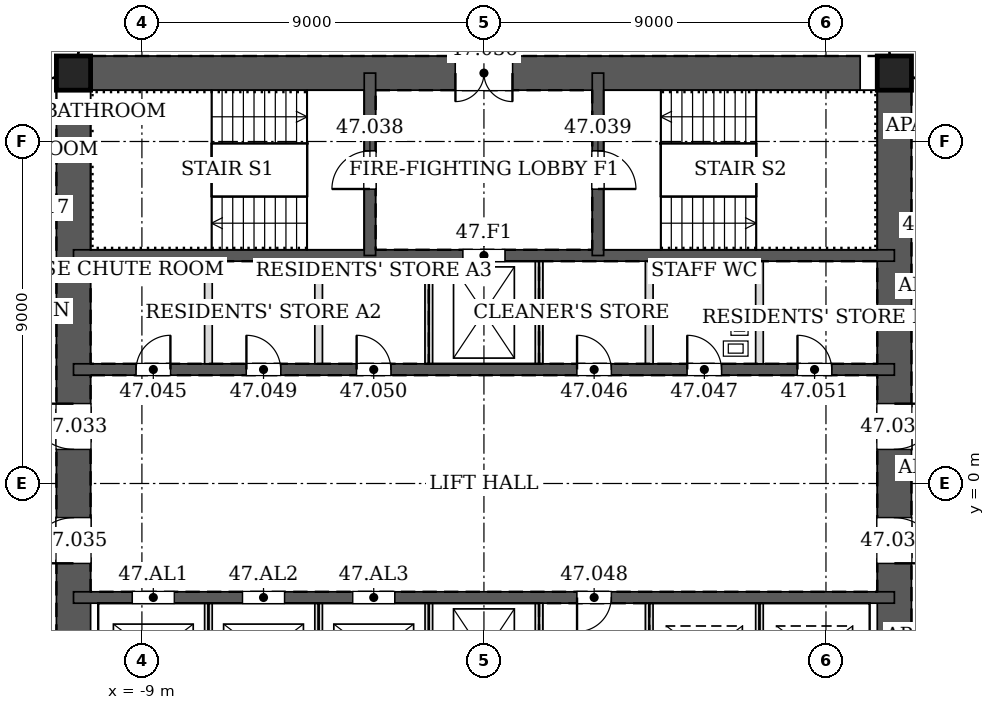
"""IFC4 building model, lengths in metres.
Left out: names, types, materials, properties, quantities, classifications, styles, units other than length and angle.
Written with IfcOpenShell. Run it as: python <this file> out.ifc"""

import sys

from ifc_helpers import new_model, si_unit, direction, frame, frame_2d, origin, origin_2d, place, context, subcontext, project, spatial, rectangle, hollow_rectangle, extrude, element, fill, save


model = new_model("IFC4")
c1 = context("Model", 3, precision=1e-05, world=origin(), true_north=direction((0.0, 1.0)))
c2 = subcontext(c1, "Body", "Model", "MODEL_VIEW")
j1 = project(units=[si_unit("LENGTHUNIT", "METRE"), si_unit("PLANEANGLEUNIT", "RADIAN")], contexts=[c1])
p1 = place(None, origin())
s1 = spatial("IfcSite", under=j1, at=p1, CompositionType="ELEMENT")
p2 = place(p1, origin())
s2 = spatial("IfcBuilding", under=s1, at=p2, CompositionType="ELEMENT")
p3 = place(p2, frame((0.0, 0.0, 207.4)))
s3 = spatial("IfcBuildingStorey", under=s2, at=p3, CompositionType="ELEMENT", Elevation=207.4)
for number, where, z_axis, x_axis in (
    (1, (10.8, 10.8, 0.0), (0.0, 0.0, 1.0), (1.0, 0.0, 0.0)),
    (2, (-10.8, 10.8, 0.0), (0.0, 0.0, 1.0), (1.0, 0.0, 0.0)),
):
    element("IfcColumn", number, at=place(p3, frame(where, z_axis=z_axis, x_axis=x_axis)), inside=s3, PredefinedType="COLUMN", context=c2, shape_type="SweptSolid", body=[
        extrude(hollow_rectangle(XDim=0.9, YDim=0.9, WallThickness=0.05, at=origin_2d()), origin(), (0.0, 0.0, 1.0), 3.4),
    ])
p4 = place(p3, frame((10.8, -10.8, 0.0), z_axis=(0.0, 0.0, 1.0), x_axis=(0.0, 1.0, 0.0)))
e3 = element("IfcWall", 3, at=p4, inside=s3, PredefinedType="SOLIDWALL", context=c2, shape_type="SweptSolid", body=[
    extrude(rectangle(XDim=21.6, YDim=0.9, at=frame_2d((10.8, 0.0))), origin(), (0.0, 0.0, 1.0), 3.4),
])
p5 = place(p4, frame((11.7, 0.0, 0.0)))
e4 = element("IfcOpeningElement", 4, at=p5, cuts=e3, PredefinedType="OPENING", context=c2, shape_type="SweptSolid", body=[
    extrude(rectangle(XDim=1.2, YDim=2.1, at=frame_2d((0.6, 1.05))), frame((0.0, 0.46, 0.0), z_axis=(0.0, -1.0, 0.0), x_axis=(1.0, 0.0, 0.0)), (0.0, 0.0, 1.0), 0.92),
])
p6 = place(p4, frame((8.7, 0.0, 0.0)))
e5 = element("IfcOpeningElement", 5, at=p6, cuts=e3, PredefinedType="OPENING", context=c2, shape_type="SweptSolid", body=[
    extrude(rectangle(XDim=1.2, YDim=2.1, at=frame_2d((0.6, 1.05))), frame((0.0, 0.46, 0.0), z_axis=(0.0, -1.0, 0.0), x_axis=(1.0, 0.0, 0.0)), (0.0, 0.0, 1.0), 0.92),
])
p7 = place(p3, frame((10.8, 10.8, 0.0), z_axis=(0.0, 0.0, 1.0), x_axis=(-1.0, 0.0, 0.0)))
e6 = element("IfcWall", 6, at=p7, inside=s3, PredefinedType="SOLIDWALL", context=c2, shape_type="SweptSolid", body=[
    extrude(rectangle(XDim=21.6, YDim=0.9, at=frame_2d((10.8, 0.0))), origin(), (0.0, 0.0, 1.0), 3.4),
])
p8 = place(p7, frame((10.05, 0.0, 0.0)))
e7 = element("IfcOpeningElement", 7, at=p8, cuts=e6, PredefinedType="OPENING", context=c2, shape_type="SweptSolid", body=[
    extrude(rectangle(XDim=1.5, YDim=2.1, at=frame_2d((0.75, 1.05))), frame((0.0, 0.46, 0.0), z_axis=(0.0, -1.0, 0.0), x_axis=(1.0, 0.0, 0.0)), (0.0, 0.0, 1.0), 0.92),
])
p9 = place(p3, frame((-10.8, 10.8, 0.0), z_axis=(0.0, 0.0, 1.0), x_axis=(0.0, -1.0, 0.0)))
e8 = element("IfcWall", 8, at=p9, inside=s3, PredefinedType="SOLIDWALL", context=c2, shape_type="SweptSolid", body=[
    extrude(rectangle(XDim=21.6, YDim=0.9, at=frame_2d((10.8, 0.0))), origin(), (0.0, 0.0, 1.0), 3.4),
])
p10 = place(p9, frame((8.7, 0.0, 0.0)))
e9 = element("IfcOpeningElement", 9, at=p10, cuts=e8, PredefinedType="OPENING", context=c2, shape_type="SweptSolid", body=[
    extrude(rectangle(XDim=1.2, YDim=2.1, at=frame_2d((0.6, 1.05))), frame((0.0, 0.46, 0.0), z_axis=(0.0, -1.0, 0.0), x_axis=(1.0, 0.0, 0.0)), (0.0, 0.0, 1.0), 0.92),
])
p11 = place(p9, frame((11.7, 0.0, 0.0)))
e10 = element("IfcOpeningElement", 10, at=p11, cuts=e8, PredefinedType="OPENING", context=c2, shape_type="SweptSolid", body=[
    extrude(rectangle(XDim=1.2, YDim=2.1, at=frame_2d((0.6, 1.05))), frame((0.0, 0.46, 0.0), z_axis=(0.0, -1.0, 0.0), x_axis=(1.0, 0.0, 0.0)), (0.0, 0.0, 1.0), 0.92),
])
p12 = place(p3, frame((-10.8, 3.0, 0.0), z_axis=(0.0, 0.0, 1.0), x_axis=(1.0, 0.0, 0.0)))
e11 = element("IfcWall", 11, at=p12, inside=s3, PredefinedType="SOLIDWALL", context=c2, shape_type="SweptSolid", body=[
    extrude(rectangle(XDim=21.6, YDim=0.3, at=frame_2d((10.8, 0.0))), origin(), (0.0, 0.0, 1.0), 3.4),
])
p13 = place(p12, frame((1.65, 0.0, 0.0)))
e12 = element("IfcOpeningElement", 12, at=p13, cuts=e11, PredefinedType="OPENING", context=c2, shape_type="SweptSolid", body=[
    extrude(rectangle(XDim=0.9, YDim=2.1, at=frame_2d((0.45, 1.05))), frame((0.0, 0.16, 0.0), z_axis=(0.0, -1.0, 0.0), x_axis=(1.0, 0.0, 0.0)), (0.0, 0.0, 1.0), 0.32),
])
p14 = place(p12, frame((13.25, 0.0, 0.0)))
e13 = element("IfcOpeningElement", 13, at=p14, cuts=e11, PredefinedType="OPENING", context=c2, shape_type="SweptSolid", body=[
    extrude(rectangle(XDim=0.9, YDim=2.1, at=frame_2d((0.45, 1.05))), frame((0.0, 0.16, 0.0), z_axis=(0.0, -1.0, 0.0), x_axis=(1.0, 0.0, 0.0)), (0.0, 0.0, 1.0), 0.32),
])
p15 = place(p12, frame((16.15, 0.0, 0.0)))
e14 = element("IfcOpeningElement", 14, at=p15, cuts=e11, PredefinedType="OPENING", context=c2, shape_type="SweptSolid", body=[
    extrude(rectangle(XDim=0.9, YDim=2.1, at=frame_2d((0.45, 1.05))), frame((0.0, 0.16, 0.0), z_axis=(0.0, -1.0, 0.0), x_axis=(1.0, 0.0, 0.0)), (0.0, 0.0, 1.0), 0.32),
])
p16 = place(p12, frame((4.55, 0.0, 0.0)))
e15 = element("IfcOpeningElement", 15, at=p16, cuts=e11, PredefinedType="OPENING", context=c2, shape_type="SweptSolid", body=[
    extrude(rectangle(XDim=0.9, YDim=2.1, at=frame_2d((0.45, 1.05))), frame((0.0, 0.16, 0.0), z_axis=(0.0, -1.0, 0.0), x_axis=(1.0, 0.0, 0.0)), (0.0, 0.0, 1.0), 0.32),
])
p17 = place(p12, frame((7.45, 0.0, 0.0)))
e16 = element("IfcOpeningElement", 16, at=p17, cuts=e11, PredefinedType="OPENING", context=c2, shape_type="SweptSolid", body=[
    extrude(rectangle(XDim=0.9, YDim=2.1, at=frame_2d((0.45, 1.05))), frame((0.0, 0.16, 0.0), z_axis=(0.0, -1.0, 0.0), x_axis=(1.0, 0.0, 0.0)), (0.0, 0.0, 1.0), 0.32),
])
p18 = place(p12, frame((19.05, 0.0, 0.0)))
e17 = element("IfcOpeningElement", 17, at=p18, cuts=e11, PredefinedType="OPENING", context=c2, shape_type="SweptSolid", body=[
    extrude(rectangle(XDim=0.9, YDim=2.1, at=frame_2d((0.45, 1.05))), frame((0.0, 0.16, 0.0), z_axis=(0.0, -1.0, 0.0), x_axis=(1.0, 0.0, 0.0)), (0.0, 0.0, 1.0), 0.32),
])
p19 = place(p3, frame((-10.8, 6.0, 0.0), z_axis=(0.0, 0.0, 1.0), x_axis=(1.0, 0.0, 0.0)))
e18 = element("IfcWall", 18, at=p19, inside=s3, PredefinedType="SOLIDWALL", context=c2, shape_type="SweptSolid", body=[
    extrude(rectangle(XDim=21.6, YDim=0.3, at=frame_2d((10.8, 0.0))), origin(), (0.0, 0.0, 1.0), 3.4),
])
p20 = place(p19, frame((10.25, 0.0, 0.0)))
e19 = element("IfcOpeningElement", 19, at=p20, cuts=e18, PredefinedType="OPENING", context=c2, shape_type="SweptSolid", body=[
    extrude(rectangle(XDim=1.1, YDim=2.1, at=frame_2d((0.55, 1.05))), frame((0.0, 0.16, 0.0), z_axis=(0.0, -1.0, 0.0), x_axis=(1.0, 0.0, 0.0)), (0.0, 0.0, 1.0), 0.32),
])
p21 = place(p3, frame((-3.0, 6.0, 0.0), z_axis=(0.0, 0.0, 1.0), x_axis=(0.0, 1.0, 0.0)))
e20 = element("IfcWall", 20, at=p21, inside=s3, PredefinedType="SOLIDWALL", context=c2, shape_type="SweptSolid", body=[
    extrude(rectangle(XDim=4.8, YDim=0.3, at=frame_2d((2.4, 0.0))), origin(), (0.0, 0.0, 1.0), 3.4),
])
p22 = place(p21, frame((1.75, 0.0, 0.0)))
e21 = element("IfcOpeningElement", 21, at=p22, cuts=e20, PredefinedType="OPENING", context=c2, shape_type="SweptSolid", body=[
    extrude(rectangle(XDim=1.0, YDim=2.1, at=frame_2d((0.5, 1.05))), frame((0.0, 0.16, 0.0), z_axis=(0.0, -1.0, 0.0), x_axis=(1.0, 0.0, 0.0)), (0.0, 0.0, 1.0), 0.32),
])
p23 = place(p3, frame((3.0, 6.0, 0.0), z_axis=(0.0, 0.0, 1.0), x_axis=(0.0, 1.0, 0.0)))
e22 = element("IfcWall", 22, at=p23, inside=s3, PredefinedType="SOLIDWALL", context=c2, shape_type="SweptSolid", body=[
    extrude(rectangle(XDim=4.8, YDim=0.3, at=frame_2d((2.4, 0.0))), origin(), (0.0, 0.0, 1.0), 3.4),
])
p24 = place(p23, frame((1.75, 0.0, 0.0)))
e23 = element("IfcOpeningElement", 23, at=p24, cuts=e22, PredefinedType="OPENING", context=c2, shape_type="SweptSolid", body=[
    extrude(rectangle(XDim=1.0, YDim=2.1, at=frame_2d((0.5, 1.05))), frame((0.0, 0.16, 0.0), z_axis=(0.0, -1.0, 0.0), x_axis=(1.0, 0.0, 0.0)), (0.0, 0.0, 1.0), 0.32),
])
p25 = place(p3, frame((-10.8, -3.0, 0.0), z_axis=(0.0, 0.0, 1.0), x_axis=(1.0, 0.0, 0.0)))
e24 = element("IfcWall", 24, at=p25, inside=s3, PredefinedType="SOLIDWALL", context=c2, shape_type="SweptSolid", body=[
    extrude(rectangle(XDim=21.6, YDim=0.3, at=frame_2d((10.8, 0.0))), origin(), (0.0, 0.0, 1.0), 3.4),
])
p26 = place(p25, frame((13.25, 0.0, 0.0)))
e25 = element("IfcOpeningElement", 25, at=p26, cuts=e24, PredefinedType="OPENING", context=c2, shape_type="SweptSolid", body=[
    extrude(rectangle(XDim=0.9, YDim=2.1, at=frame_2d((0.45, 1.05))), frame((0.0, 0.16, 0.0), z_axis=(0.0, -1.0, 0.0), x_axis=(1.0, 0.0, 0.0)), (0.0, 0.0, 1.0), 0.32),
])
p27 = place(p25, frame((1.55, 0.0, 0.0)))
e26 = element("IfcOpeningElement", 26, at=p27, cuts=e24, PredefinedType="OPENING", context=c2, shape_type="SweptSolid", body=[
    extrude(rectangle(XDim=1.1, YDim=2.1, at=frame_2d((0.55, 1.05))), frame((0.0, 0.16, 0.0), z_axis=(0.0, -1.0, 0.0), x_axis=(1.0, 0.0, 0.0)), (0.0, 0.0, 1.0), 0.32),
])
p28 = place(p25, frame((4.45, 0.0, 0.0)))
e27 = element("IfcOpeningElement", 27, at=p28, cuts=e24, PredefinedType="OPENING", context=c2, shape_type="SweptSolid", body=[
    extrude(rectangle(XDim=1.1, YDim=2.1, at=frame_2d((0.55, 1.05))), frame((0.0, 0.16, 0.0), z_axis=(0.0, -1.0, 0.0), x_axis=(1.0, 0.0, 0.0)), (0.0, 0.0, 1.0), 0.32),
])
p29 = place(p25, frame((7.35, 0.0, 0.0)))
e28 = element("IfcOpeningElement", 28, at=p29, cuts=e24, PredefinedType="OPENING", context=c2, shape_type="SweptSolid", body=[
    extrude(rectangle(XDim=1.1, YDim=2.1, at=frame_2d((0.55, 1.05))), frame((0.0, 0.16, 0.0), z_axis=(0.0, -1.0, 0.0), x_axis=(1.0, 0.0, 0.0)), (0.0, 0.0, 1.0), 0.32),
])
for number, where, z_axis, x_axis in (
    (29, (-7.25, 3.15, 0.0), (0.0, 0.0, 1.0), (0.0, 1.0, 0.0)),
    (30, (-4.35, 3.15, 0.0), (0.0, 0.0, 1.0), (0.0, 1.0, 0.0)),
    (31, (-1.45, 3.15, 0.0), (0.0, 0.0, 1.0), (0.0, 1.0, 0.0)),
    (32, (1.45, 3.15, 0.0), (0.0, 0.0, 1.0), (0.0, 1.0, 0.0)),
    (33, (4.35, 3.15, 0.0), (0.0, 0.0, 1.0), (0.0, 1.0, 0.0)),
    (34, (7.25, 3.15, 0.0), (0.0, 0.0, 1.0), (0.0, 1.0, 0.0)),
):
    element("IfcWall", number, at=place(p3, frame(where, z_axis=z_axis, x_axis=x_axis)), inside=s3, PredefinedType="PARTITIONING", context=c2, shape_type="SweptSolid", body=[
        extrude(rectangle(XDim=2.7, YDim=0.2, at=frame_2d((1.35, 0.0))), origin(), (0.0, 0.0, 1.0), 3.2),
    ])
for number, where, z_axis, x_axis in (
    (35, (-7.25, -5.85, 0.0), (0.0, 0.0, 1.0), (0.0, 1.0, 0.0)),
    (36, (-4.35, -5.85, 0.0), (0.0, 0.0, 1.0), (0.0, 1.0, 0.0)),
    (37, (-1.45, -5.85, 0.0), (0.0, 0.0, 1.0), (0.0, 1.0, 0.0)),
):
    element("IfcWall", number, at=place(p3, frame(where, z_axis=z_axis, x_axis=x_axis)), inside=s3, PredefinedType="PARTITIONING", context=c2, shape_type="SweptSolid", body=[
        extrude(rectangle(XDim=2.7, YDim=0.2, at=frame_2d((1.35, 0.0))), origin(), (0.0, 0.0, 1.0), 3.4),
    ])
for number, where, z_axis, x_axis in (
    (38, (1.45, -5.85, 0.0), (0.0, 0.0, 1.0), (0.0, 1.0, 0.0)),
    (39, (4.35, -5.85, 0.0), (0.0, 0.0, 1.0), (0.0, 1.0, 0.0)),
):
    element("IfcWall", number, at=place(p3, frame(where, z_axis=z_axis, x_axis=x_axis)), inside=s3, PredefinedType="PARTITIONING", context=c2, shape_type="SweptSolid", body=[
        extrude(rectangle(XDim=2.7, YDim=0.2, at=frame_2d((1.35, 0.0))), origin(), (0.0, 0.0, 1.0), 3.2),
    ])
p30 = place(p3, frame((7.25, -5.85, 0.0), z_axis=(0.0, 0.0, 1.0), x_axis=(0.0, 1.0, 0.0)))
e40 = element("IfcWall", 40, at=p30, inside=s3, PredefinedType="PARTITIONING", context=c2, shape_type="SweptSolid", body=[
    extrude(rectangle(XDim=2.7, YDim=0.2, at=frame_2d((1.35, 0.0))), origin(), (0.0, 0.0, 1.0), 3.4),
])
p31 = place(p5, frame((1.2, 0.0, 0.0), z_axis=(0.0, 0.0, 1.0), x_axis=(-1.0, 0.0, 0.0)))
e41 = element("IfcDoor", 41, at=p31, inside=s3, OperationType="SINGLE_SWING_LEFT", PredefinedType="DOOR", context=c2, shape_type="SweptSolid", body=[
    extrude(rectangle(XDim=1.2, YDim=2.1, at=frame_2d((0.6, 1.05))), frame((0.0, 0.025, 0.0), z_axis=(0.0, -1.0, 0.0), x_axis=(1.0, 0.0, 0.0)), (0.0, 0.0, 1.0), 0.05),
])
fill(e4, e41)
p32 = place(p10, frame((1.2, 0.0, 0.0), z_axis=(0.0, 0.0, 1.0), x_axis=(-1.0, 0.0, 0.0)))
e42 = element("IfcDoor", 42, at=p32, inside=s3, OperationType="SINGLE_SWING_RIGHT", PredefinedType="DOOR", context=c2, shape_type="SweptSolid", body=[
    extrude(rectangle(XDim=1.2, YDim=2.1, at=frame_2d((0.6, 1.05))), frame((0.0, 0.025, 0.0), z_axis=(0.0, -1.0, 0.0), x_axis=(1.0, 0.0, 0.0)), (0.0, 0.0, 1.0), 0.05),
])
fill(e9, e42)
p33 = place(p6, frame((1.2, 0.0, 0.0), z_axis=(0.0, 0.0, 1.0), x_axis=(-1.0, 0.0, 0.0)))
e43 = element("IfcDoor", 43, at=p33, inside=s3, OperationType="SINGLE_SWING_RIGHT", PredefinedType="DOOR", context=c2, shape_type="SweptSolid", body=[
    extrude(rectangle(XDim=1.2, YDim=2.1, at=frame_2d((0.6, 1.05))), frame((0.0, 0.025, 0.0), z_axis=(0.0, -1.0, 0.0), x_axis=(1.0, 0.0, 0.0)), (0.0, 0.0, 1.0), 0.05),
])
fill(e5, e43)
p34 = place(p11, frame((1.2, 0.0, 0.0), z_axis=(0.0, 0.0, 1.0), x_axis=(-1.0, 0.0, 0.0)))
e44 = element("IfcDoor", 44, at=p34, inside=s3, OperationType="SINGLE_SWING_LEFT", PredefinedType="DOOR", context=c2, shape_type="SweptSolid", body=[
    extrude(rectangle(XDim=1.2, YDim=2.1, at=frame_2d((0.6, 1.05))), frame((0.0, 0.025, 0.0), z_axis=(0.0, -1.0, 0.0), x_axis=(1.0, 0.0, 0.0)), (0.0, 0.0, 1.0), 0.05),
])
fill(e10, e44)
p35 = place(p8, origin())
e45 = element("IfcDoor", 45, at=p35, inside=s3, OperationType="DOUBLE_DOOR_SINGLE_SWING", PredefinedType="DOOR", context=c2, shape_type="SweptSolid", body=[
    extrude(rectangle(XDim=1.5, YDim=2.1, at=frame_2d((0.75, 1.05))), frame((0.0, 0.025, 0.0), z_axis=(0.0, -1.0, 0.0), x_axis=(1.0, 0.0, 0.0)), (0.0, 0.0, 1.0), 0.05),
])
fill(e7, e45)
p36 = place(p22, origin())
e46 = element("IfcDoor", 46, at=p36, inside=s3, OperationType="SINGLE_SWING_LEFT", PredefinedType="DOOR", context=c2, shape_type="SweptSolid", body=[
    extrude(rectangle(XDim=1.0, YDim=2.1, at=frame_2d((0.5, 1.05))), frame((0.0, 0.025, 0.0), z_axis=(0.0, -1.0, 0.0), x_axis=(1.0, 0.0, 0.0)), (0.0, 0.0, 1.0), 0.05),
])
fill(e21, e46)
p37 = place(p24, frame((1.0, 0.0, 0.0), z_axis=(0.0, 0.0, 1.0), x_axis=(-1.0, 0.0, 0.0)))
e47 = element("IfcDoor", 47, at=p37, inside=s3, OperationType="SINGLE_SWING_RIGHT", PredefinedType="DOOR", context=c2, shape_type="SweptSolid", body=[
    extrude(rectangle(XDim=1.0, YDim=2.1, at=frame_2d((0.5, 1.05))), frame((0.0, 0.025, 0.0), z_axis=(0.0, -1.0, 0.0), x_axis=(1.0, 0.0, 0.0)), (0.0, 0.0, 1.0), 0.05),
])
fill(e23, e47)
p38 = place(p13, origin())
e48 = element("IfcDoor", 48, at=p38, inside=s3, OperationType="SINGLE_SWING_RIGHT", PredefinedType="DOOR", context=c2, shape_type="SweptSolid", body=[
    extrude(rectangle(XDim=0.9, YDim=2.1, at=frame_2d((0.45, 1.05))), frame((0.0, 0.025, 0.0), z_axis=(0.0, -1.0, 0.0), x_axis=(1.0, 0.0, 0.0)), (0.0, 0.0, 1.0), 0.05),
])
fill(e12, e48)
p39 = place(p14, origin())
e49 = element("IfcDoor", 49, at=p39, inside=s3, OperationType="SINGLE_SWING_LEFT", PredefinedType="DOOR", context=c2, shape_type="SweptSolid", body=[
    extrude(rectangle(XDim=0.9, YDim=2.1, at=frame_2d((0.45, 1.05))), frame((0.0, 0.025, 0.0), z_axis=(0.0, -1.0, 0.0), x_axis=(1.0, 0.0, 0.0)), (0.0, 0.0, 1.0), 0.05),
])
fill(e13, e49)
p40 = place(p15, origin())
e50 = element("IfcDoor", 50, at=p40, inside=s3, OperationType="SINGLE_SWING_LEFT", PredefinedType="DOOR", context=c2, shape_type="SweptSolid", body=[
    extrude(rectangle(XDim=0.9, YDim=2.1, at=frame_2d((0.45, 1.05))), frame((0.0, 0.025, 0.0), z_axis=(0.0, -1.0, 0.0), x_axis=(1.0, 0.0, 0.0)), (0.0, 0.0, 1.0), 0.05),
])
fill(e14, e50)
p41 = place(p26, frame((0.9, 0.0, 0.0), z_axis=(0.0, 0.0, 1.0), x_axis=(-1.0, 0.0, 0.0)))
e51 = element("IfcDoor", 51, at=p41, inside=s3, OperationType="SINGLE_SWING_RIGHT", PredefinedType="DOOR", context=c2, shape_type="SweptSolid", body=[
    extrude(rectangle(XDim=0.9, YDim=2.1, at=frame_2d((0.45, 1.05))), frame((0.0, 0.025, 0.0), z_axis=(0.0, -1.0, 0.0), x_axis=(1.0, 0.0, 0.0)), (0.0, 0.0, 1.0), 0.05),
])
fill(e25, e51)
p42 = place(p16, origin())
e52 = element("IfcDoor", 52, at=p42, inside=s3, OperationType="SINGLE_SWING_LEFT", PredefinedType="DOOR", context=c2, shape_type="SweptSolid", body=[
    extrude(rectangle(XDim=0.9, YDim=2.1, at=frame_2d((0.45, 1.05))), frame((0.0, 0.025, 0.0), z_axis=(0.0, -1.0, 0.0), x_axis=(1.0, 0.0, 0.0)), (0.0, 0.0, 1.0), 0.05),
])
fill(e15, e52)
p43 = place(p17, origin())
e53 = element("IfcDoor", 53, at=p43, inside=s3, OperationType="SINGLE_SWING_LEFT", PredefinedType="DOOR", context=c2, shape_type="SweptSolid", body=[
    extrude(rectangle(XDim=0.9, YDim=2.1, at=frame_2d((0.45, 1.05))), frame((0.0, 0.025, 0.0), z_axis=(0.0, -1.0, 0.0), x_axis=(1.0, 0.0, 0.0)), (0.0, 0.0, 1.0), 0.05),
])
fill(e16, e53)
p44 = place(p18, origin())
e54 = element("IfcDoor", 54, at=p44, inside=s3, OperationType="SINGLE_SWING_LEFT", PredefinedType="DOOR", context=c2, shape_type="SweptSolid", body=[
    extrude(rectangle(XDim=0.9, YDim=2.1, at=frame_2d((0.45, 1.05))), frame((0.0, 0.025, 0.0), z_axis=(0.0, -1.0, 0.0), x_axis=(1.0, 0.0, 0.0)), (0.0, 0.0, 1.0), 0.05),
])
fill(e17, e54)
p45 = place(p20, origin())
e55 = element("IfcDoor", 55, at=p45, inside=s3, OperationType="DOUBLE_DOOR_SLIDING", PredefinedType="DOOR", context=c2, shape_type="SweptSolid", body=[
    extrude(rectangle(XDim=1.1, YDim=2.1, at=frame_2d((0.55, 1.05))), frame((0.0, 0.025, 0.0), z_axis=(0.0, -1.0, 0.0), x_axis=(1.0, 0.0, 0.0)), (0.0, 0.0, 1.0), 0.05),
])
fill(e19, e55)
p46 = place(p27, origin())
e56 = element("IfcDoor", 56, at=p46, inside=s3, OperationType="DOUBLE_DOOR_SLIDING", PredefinedType="DOOR", context=c2, shape_type="SweptSolid", body=[
    extrude(rectangle(XDim=1.1, YDim=2.1, at=frame_2d((0.55, 1.05))), frame((0.0, 0.025, 0.0), z_axis=(0.0, -1.0, 0.0), x_axis=(1.0, 0.0, 0.0)), (0.0, 0.0, 1.0), 0.05),
])
fill(e26, e56)
p47 = place(p28, origin())
e57 = element("IfcDoor", 57, at=p47, inside=s3, OperationType="DOUBLE_DOOR_SLIDING", PredefinedType="DOOR", context=c2, shape_type="SweptSolid", body=[
    extrude(rectangle(XDim=1.1, YDim=2.1, at=frame_2d((0.55, 1.05))), frame((0.0, 0.025, 0.0), z_axis=(0.0, -1.0, 0.0), x_axis=(1.0, 0.0, 0.0)), (0.0, 0.0, 1.0), 0.05),
])
fill(e27, e57)
p48 = place(p29, origin())
e58 = element("IfcDoor", 58, at=p48, inside=s3, OperationType="DOUBLE_DOOR_SLIDING", PredefinedType="DOOR", context=c2, shape_type="SweptSolid", body=[
    extrude(rectangle(XDim=1.1, YDim=2.1, at=frame_2d((0.55, 1.05))), frame((0.0, 0.025, 0.0), z_axis=(0.0, -1.0, 0.0), x_axis=(1.0, 0.0, 0.0)), (0.0, 0.0, 1.0), 0.05),
])
fill(e28, e58)
save(model, sys.argv[1])
